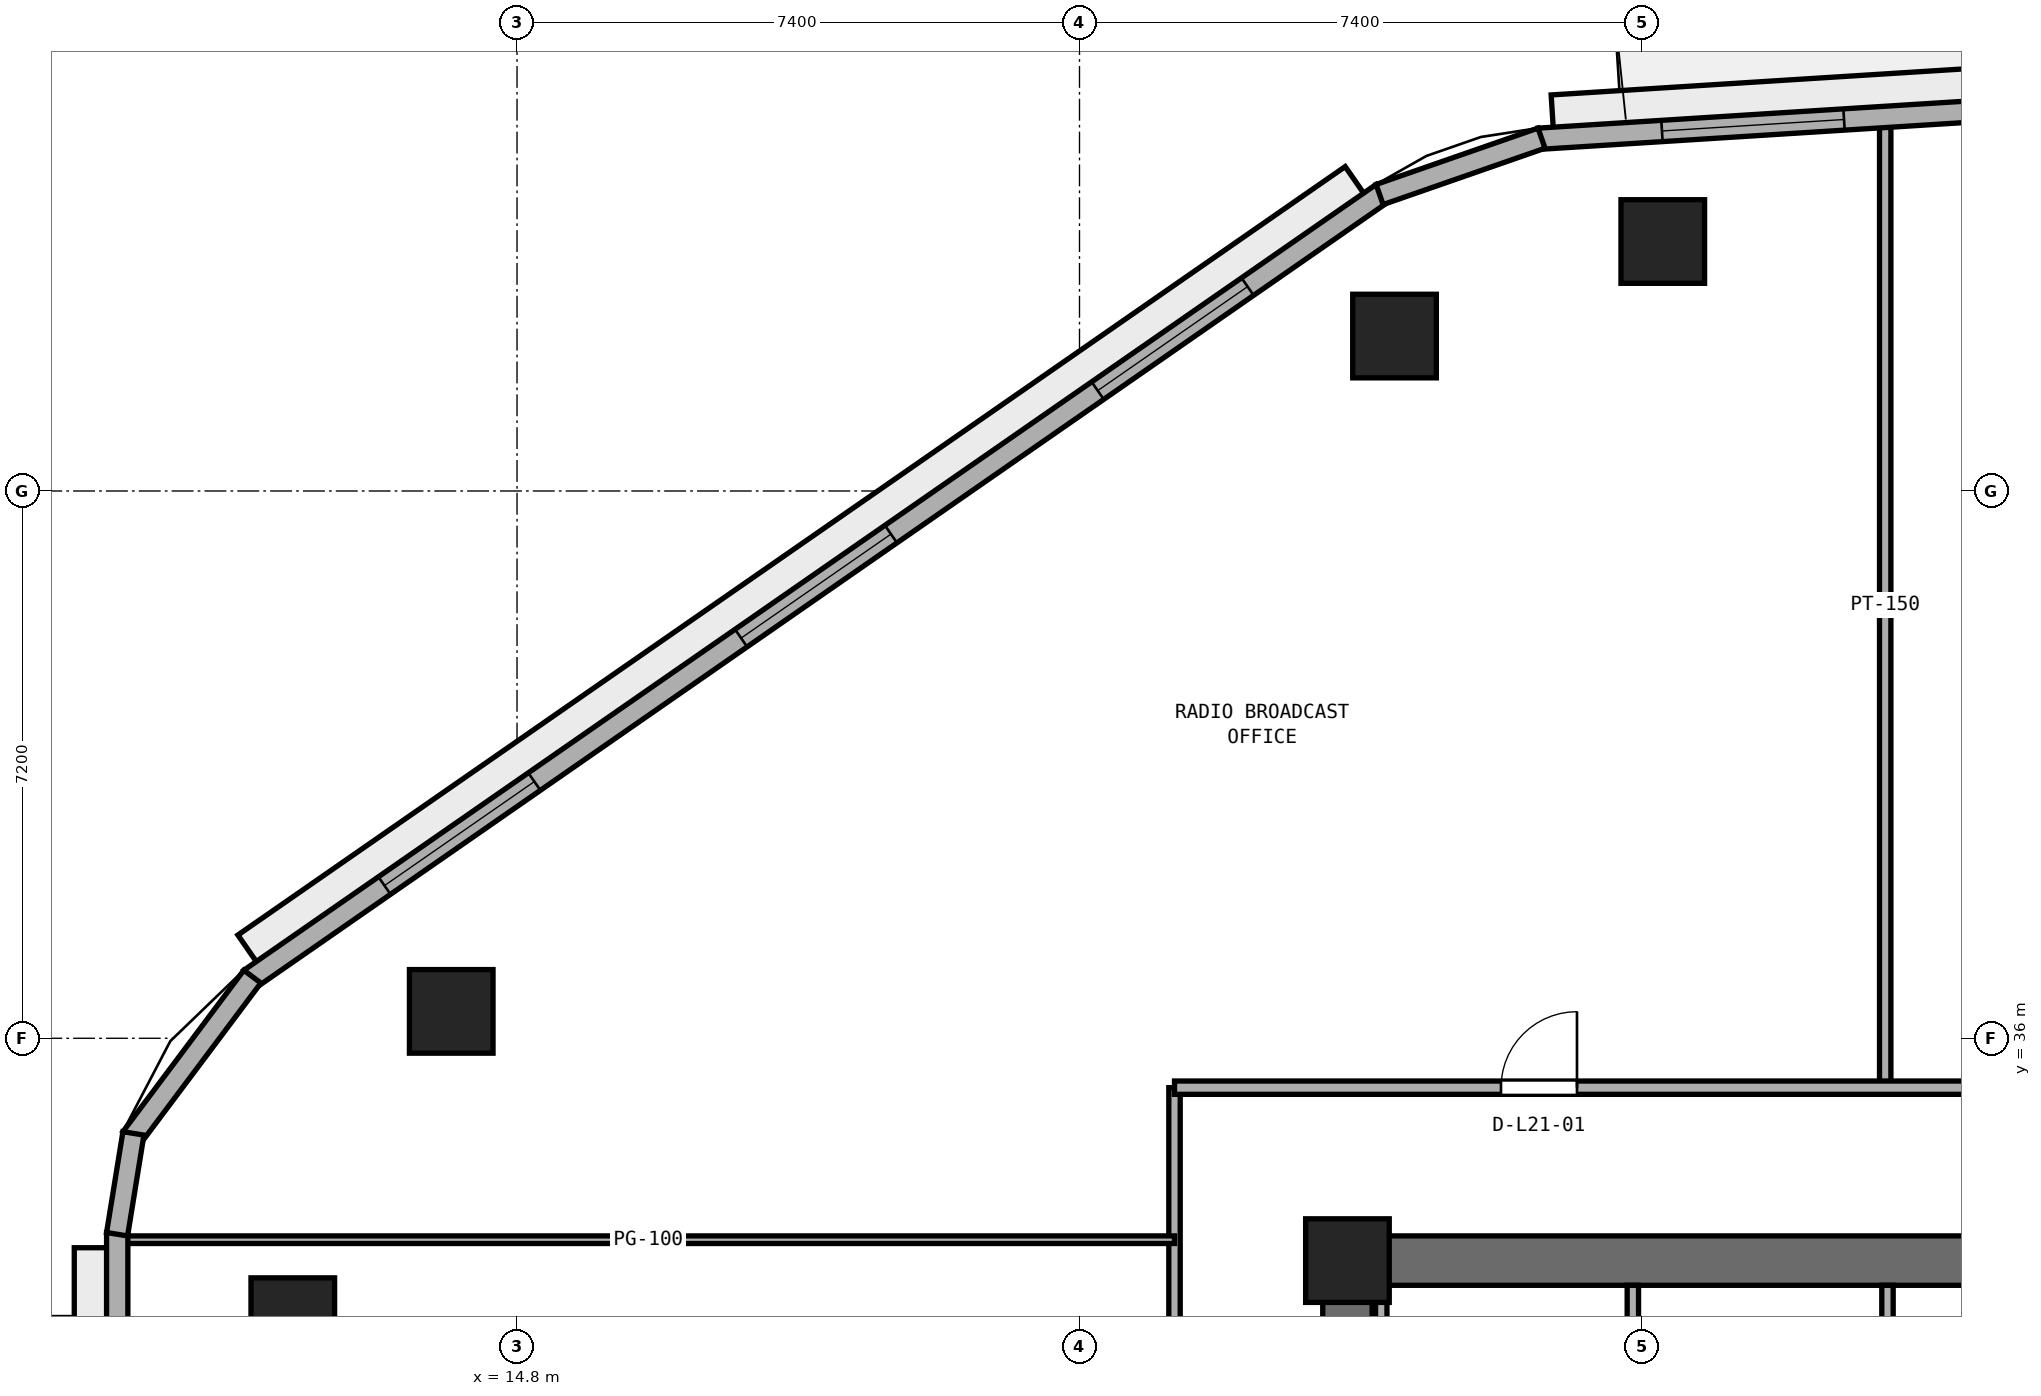
"""IFC4 building model, lengths in metres.
Left out: names, types, materials, properties, quantities, classifications, styles, units other than length and angle.
Written with IfcOpenShell. Run it as: python <this file> out.ifc"""

import sys

from ifc_helpers import new_model, si_unit, direction, frame, frame_2d, origin, origin_2d, place, context, subcontext, project, spatial, rectangle, extrude, element, fill, save


model = new_model("IFC4")
c1 = context("Model", 3, precision=1e-05, world=origin(), true_north=direction((0.0, 1.0)))
c2 = subcontext(c1, "Body", "Model", "MODEL_VIEW")
j1 = project(units=[si_unit("LENGTHUNIT", "METRE"), si_unit("PLANEANGLEUNIT", "RADIAN")], contexts=[c1])
p1 = place(None, origin())
s1 = spatial("IfcSite", under=j1, at=p1, CompositionType="ELEMENT")
p2 = place(p1, origin())
s2 = spatial("IfcBuilding", under=s1, at=p2, CompositionType="ELEMENT")
p3 = place(p2, frame((0.0, 0.0, 85.8)))
s3 = spatial("IfcBuildingStorey", under=s2, at=p3, CompositionType="ELEMENT", Elevation=85.8)
p4 = place(p3, frame((25.4, 33.075, 0.0), z_axis=(0.0, 0.0, 1.0), x_axis=(1.0, 0.0, 0.0)))
e1 = element("IfcWall", 1, at=p4, inside=s3, PredefinedType="SHEAR", context=c2, shape_type="SweptSolid", body=[
    extrude(rectangle(XDim=23.2, YDim=0.65, at=frame_2d((11.6, 0.0))), origin(), (0.0, 0.0, 1.0), 3.525),
])
p5 = place(p3, frame((25.725, 17.65, 0.0), z_axis=(0.0, 0.0, 1.0), x_axis=(0.0, 1.0, 0.0)))
e2 = element("IfcWall", 2, at=p5, inside=s3, PredefinedType="SHEAR", context=c2, shape_type="SweptSolid", body=[
    extrude(rectangle(XDim=15.1, YDim=0.65, at=frame_2d((7.55, 0.0))), origin(), (0.0, 0.0, 1.0), 3.525),
])
p6 = place(p5, frame((6.8, 0.0, 0.0)))
e3 = element("IfcOpeningElement", 3, at=p6, cuts=e2, PredefinedType="OPENING", context=c2, shape_type="SweptSolid", body=[
    extrude(rectangle(XDim=1.5, YDim=2.15, at=frame_2d((0.75, 1.075))), frame((0.0, 0.335, 0.0), z_axis=(0.0, -1.0, 0.0), x_axis=(1.0, 0.0, 0.0)), (0.0, 0.0, 1.0), 0.67),
])
p7 = place(p3, frame((25.725, 33.075, 0.0), z_axis=(0.0, 0.0, 1.0), x_axis=(1.0, 0.0, 0.0)))
e4 = element("IfcColumn", 4, at=p7, inside=s3, PredefinedType="PILASTER", context=c2, shape_type="SweptSolid", body=[
    extrude(rectangle(XDim=1.1, YDim=1.1, at=origin_2d()), origin(), (0.0, 0.0, 1.0), 3.8),
])
for number, where, z_axis, x_axis in (
    (5, (29.874, 46.482, 0.0), (0.0, 0.0, 1.0), (1.0, 0.0, 0.0)),
    (6, (26.344, 45.238, 0.0), (0.0, 0.0, 1.0), (1.0, 0.0, 0.0)),
    (7, (13.934, 36.354, 0.0), (0.0, 0.0, 1.0), (1.0, 0.0, 0.0)),
    (8, (11.85, 32.298, 0.0), (0.0, 0.0, 1.0), (1.0, 0.0, 0.0)),
):
    element("IfcColumn", number, at=place(p3, frame(where, z_axis=z_axis, x_axis=x_axis)), inside=s3, PredefinedType="COLUMN", context=c2, shape_type="SweptSolid", body=[
        extrude(rectangle(XDim=1.1, YDim=1.1, at=origin_2d()), origin(), (0.0, 0.0, 1.0), 3.8),
    ])
for number, where, z_axis, x_axis in (
    (9, (26.17, 30.65, 0.0), (0.0, 0.0, 1.0), (0.0, 1.0, 0.0)),
    (10, (29.48, 30.65, 0.0), (0.0, 0.0, 1.0), (0.0, 1.0, 0.0)),
    (11, (32.83, 30.65, 0.0), (0.0, 0.0, 1.0), (0.0, 1.0, 0.0)),
):
    element("IfcWall", number, at=place(p3, frame(where, z_axis=z_axis, x_axis=x_axis)), inside=s3, PredefinedType="PARTITIONING", context=c2, shape_type="SweptSolid", body=[
        extrude(rectangle(XDim=2.1, YDim=0.15, at=frame_2d((1.05, 0.0))), origin(), (0.0, 0.0, 1.0), 3.525),
    ])
p8 = place(p3, frame((32.8, 35.35, 0.0), z_axis=(0.0, 0.0, 1.0), x_axis=(0.0, 1.0, 0.0)))
e12 = element("IfcWall", 12, at=p8, inside=s3, PredefinedType="PARTITIONING", context=c2, shape_type="SweptSolid", body=[
    extrude(rectangle(XDim=12.707, YDim=0.15, at=frame_2d((6.353, 0.0))), origin(), (0.0, 0.0, 1.0), 3.525),
])
p9 = place(p3, frame((23.45, 15.05, 0.0), z_axis=(0.0, 0.0, 1.0), x_axis=(0.0, 1.0, 0.0)))
e13 = element("IfcWall", 13, at=p9, inside=s3, PredefinedType="PARTITIONING", context=c2, shape_type="SweptSolid", body=[
    extrude(rectangle(XDim=20.3, YDim=0.15, at=frame_2d((10.15, 0.0))), origin(), (0.0, 0.0, 1.0), 3.525),
])
p10 = place(p9, frame((8.025, 0.0, 0.0)))
e14 = element("IfcOpeningElement", 14, at=p10, cuts=e13, PredefinedType="OPENING", context=c2, shape_type="SweptSolid", body=[
    extrude(rectangle(XDim=0.9, YDim=2.1, at=frame_2d((0.45, 1.05))), frame((0.0, 0.085, 0.0), z_axis=(0.0, -1.0, 0.0), x_axis=(1.0, 0.0, 0.0)), (0.0, 0.0, 1.0), 0.17),
])
p11 = place(p9, frame((16.175, 0.0, 0.0)))
e15 = element("IfcOpeningElement", 15, at=p11, cuts=e13, PredefinedType="OPENING", context=c2, shape_type="SweptSolid", body=[
    extrude(rectangle(XDim=0.9, YDim=2.1, at=frame_2d((0.45, 1.05))), frame((0.0, 0.085, 0.0), z_axis=(0.0, -1.0, 0.0), x_axis=(1.0, 0.0, 0.0)), (0.0, 0.0, 1.0), 0.17),
])
p12 = place(p3, frame((9.605, 33.35, 0.0), z_axis=(0.0, 0.0, 1.0), x_axis=(1.0, 0.0, 0.0)))
e16 = element("IfcWall", 16, at=p12, inside=s3, PredefinedType="PARTITIONING", context=c2, shape_type="SweptSolid", body=[
    extrude(rectangle(XDim=13.845, YDim=0.1, at=frame_2d((6.922, 0.0))), origin(), (0.0, 0.0, 1.0), 3.525),
])
p13 = place(p3, frame((23.45, 35.35, 0.0), z_axis=(0.0, 0.0, 1.0), x_axis=(1.0, 0.0, 0.0)))
e17 = element("IfcWall", 17, at=p13, inside=s3, PredefinedType="PARTITIONING", context=c2, shape_type="SweptSolid", body=[
    extrude(rectangle(XDim=27.1, YDim=0.175, at=frame_2d((13.55, 0.0))), origin(), (0.0, 0.0, 1.0), 3.525),
])
p14 = place(p13, frame((4.295, 0.0, 0.0)))
e18 = element("IfcOpeningElement", 18, at=p14, cuts=e17, PredefinedType="OPENING", context=c2, shape_type="SweptSolid", body=[
    extrude(rectangle(XDim=1.0, YDim=2.12, at=frame_2d((0.5, 1.06))), frame((0.0, 0.097, 0.0), z_axis=(0.0, -1.0, 0.0), x_axis=(1.0, 0.0, 0.0)), (0.0, 0.0, 1.0), 0.195),
])
p15 = place(p13, frame((14.6, 0.0, 0.0)))
e19 = element("IfcOpeningElement", 19, at=p15, cuts=e17, PredefinedType="OPENING", context=c2, shape_type="SweptSolid", body=[
    extrude(rectangle(XDim=1.0, YDim=2.12, at=frame_2d((0.5, 1.06))), frame((0.0, 0.097, 0.0), z_axis=(0.0, -1.0, 0.0), x_axis=(1.0, 0.0, 0.0)), (0.0, 0.0, 1.0), 0.195),
])
p16 = place(p13, frame((23.405, 0.0, 0.0)))
e20 = element("IfcOpeningElement", 20, at=p16, cuts=e17, PredefinedType="OPENING", context=c2, shape_type="SweptSolid", body=[
    extrude(rectangle(XDim=0.9, YDim=2.1, at=frame_2d((0.45, 1.05))), frame((0.0, 0.097, 0.0), z_axis=(0.0, -1.0, 0.0), x_axis=(1.0, 0.0, 0.0)), (0.0, 0.0, 1.0), 0.195),
])
p17 = place(p3, frame((47.832, 49.069, 0.0), z_axis=(0.0, 0.0, 1.0), x_axis=(-0.998017725054, -0.062933460723, 0.0)))
e21 = element("IfcWall", 21, at=p17, inside=s3, PredefinedType="STANDARD", context=c2, shape_type="SweptSolid", body=[
    extrude(rectangle(XDim=19.629, YDim=0.28, at=frame_2d((9.815, 0.0))), origin(), (0.0, 0.0, 1.0), 3.525),
])
p18 = place(p17, frame((9.265, 0.0, 0.0)))
e22 = element("IfcOpeningElement", 22, at=p18, cuts=e21, PredefinedType="OPENING", context=c2, shape_type="SweptSolid", body=[
    extrude(rectangle(XDim=1.1, YDim=2.2, at=frame_2d((0.55, 1.1))), frame((0.0, 0.15, 0.0), z_axis=(0.0, -1.0, 0.0), x_axis=(1.0, 0.0, 0.0)), (0.0, 0.0, 1.0), 0.3),
])
p19 = place(p17, frame((15.604, 0.0, 0.9)))
e23 = element("IfcOpeningElement", 23, at=p19, cuts=e21, PredefinedType="OPENING", context=c2, shape_type="SweptSolid", body=[
    extrude(rectangle(XDim=2.4, YDim=1.75, at=frame_2d((1.2, 0.875))), frame((0.0, 0.15, 0.0), z_axis=(0.0, -1.0, 0.0), x_axis=(1.0, 0.0, 0.0)), (0.0, 0.0, 1.0), 0.3),
])
p20 = place(p3, frame((26.182, 47.118, 0.0), z_axis=(0.0, 0.0, 1.0), x_axis=(-0.821547956627, -0.570139417127, 0.0)))
e24 = element("IfcWall", 24, at=p20, inside=s3, PredefinedType="STANDARD", context=c2, shape_type="SweptSolid", body=[
    extrude(rectangle(XDim=18.132, YDim=0.28, at=frame_2d((9.066, 0.0))), origin(), (0.0, 0.0, 1.0), 3.525),
])
p21 = place(p20, frame((2.156, 0.0, 0.9)))
e25 = element("IfcOpeningElement", 25, at=p21, cuts=e24, PredefinedType="OPENING", context=c2, shape_type="SweptSolid", body=[
    extrude(rectangle(XDim=2.4, YDim=1.75, at=frame_2d((1.2, 0.875))), frame((0.0, 0.15, 0.0), z_axis=(0.0, -1.0, 0.0), x_axis=(1.0, 0.0, 0.0)), (0.0, 0.0, 1.0), 0.3),
])
p22 = place(p20, frame((7.866, 0.0, 0.9)))
e26 = element("IfcOpeningElement", 26, at=p22, cuts=e24, PredefinedType="OPENING", context=c2, shape_type="SweptSolid", body=[
    extrude(rectangle(XDim=2.4, YDim=1.75, at=frame_2d((1.2, 0.875))), frame((0.0, 0.15, 0.0), z_axis=(0.0, -1.0, 0.0), x_axis=(1.0, 0.0, 0.0)), (0.0, 0.0, 1.0), 0.3),
])
p23 = place(p20, frame((13.577, 0.0, 0.9)))
e27 = element("IfcOpeningElement", 27, at=p23, cuts=e24, PredefinedType="OPENING", context=c2, shape_type="SweptSolid", body=[
    extrude(rectangle(XDim=2.4, YDim=1.75, at=frame_2d((1.2, 0.875))), frame((0.0, 0.15, 0.0), z_axis=(0.0, -1.0, 0.0), x_axis=(1.0, 0.0, 0.0)), (0.0, 0.0, 1.0), 0.3),
])
p24 = place(p3, frame((9.54, 33.444, 0.0), z_axis=(0.0, 0.0, 1.0), x_axis=(0.0, -1.0, 0.0)))
e28 = element("IfcWall", 28, at=p24, inside=s3, PredefinedType="STANDARD", context=c2, shape_type="SweptSolid", body=[
    extrude(rectangle(XDim=17.301, YDim=0.28, at=frame_2d((8.65, 0.0))), origin(), (0.0, 0.0, 1.0), 3.525),
])
p25 = place(p24, frame((8.1, 0.0, 0.0)))
e29 = element("IfcOpeningElement", 29, at=p25, cuts=e28, PredefinedType="OPENING", context=c2, shape_type="SweptSolid", body=[
    extrude(rectangle(XDim=1.1, YDim=2.2, at=frame_2d((0.55, 1.1))), frame((0.0, 0.15, 0.0), z_axis=(0.0, -1.0, 0.0), x_axis=(1.0, 0.0, 0.0)), (0.0, 0.0, 1.0), 0.3),
])
p26 = place(p24, frame((12.884, 0.0, 0.9)))
e30 = element("IfcOpeningElement", 30, at=p26, cuts=e28, PredefinedType="OPENING", context=c2, shape_type="SweptSolid", body=[
    extrude(rectangle(XDim=2.4, YDim=1.75, at=frame_2d((1.2, 0.875))), frame((0.0, 0.15, 0.0), z_axis=(0.0, -1.0, 0.0), x_axis=(1.0, 0.0, 0.0)), (0.0, 0.0, 1.0), 0.3),
])
p27 = place(p3, frame((28.278, 47.842, 0.0), z_axis=(0.0, 0.0, 1.0), x_axis=(-0.9444559001, -0.328638179106, 0.0)))
e31 = element("IfcWall", 31, at=p27, inside=s3, PredefinedType="STANDARD", context=c2, shape_type="SweptSolid", body=[
    extrude(rectangle(XDim=2.255, YDim=0.28, at=frame_2d((1.128, 0.0))), origin(), (0.0, 0.0, 1.0), 3.525),
])
p28 = place(p3, frame((11.318, 36.811, 0.0), z_axis=(0.0, 0.0, 1.0), x_axis=(-0.599455152629, -0.800408345775, 0.0)))
e32 = element("IfcWall", 32, at=p28, inside=s3, PredefinedType="STANDARD", context=c2, shape_type="SweptSolid", body=[
    extrude(rectangle(XDim=2.653, YDim=0.28, at=frame_2d((1.327, 0.0))), origin(), (0.0, 0.0, 1.0), 3.525),
])
p29 = place(p3, frame((9.753, 34.749, 0.0), z_axis=(0.0, 0.0, 1.0), x_axis=(-0.160037671962, -0.987110907423, 0.0)))
e33 = element("IfcWall", 33, at=p29, inside=s3, PredefinedType="STANDARD", context=c2, shape_type="SweptSolid", body=[
    extrude(rectangle(XDim=1.344, YDim=0.28, at=frame_2d((0.672, 0.0))), origin(), (0.0, 0.0, 1.0), 3.525),
])
p30 = place(p14, origin())
e34 = element("IfcDoor", 34, at=p30, inside=s3, OperationType="SINGLE_SWING_RIGHT", PredefinedType="DOOR", context=c2, shape_type="SweptSolid", body=[
    extrude(rectangle(XDim=1.0, YDim=2.12, at=frame_2d((0.5, 1.06))), frame((0.0, 0.025, 0.0), z_axis=(0.0, -1.0, 0.0), x_axis=(1.0, 0.0, 0.0)), (0.0, 0.0, 1.0), 0.05),
])
fill(e18, e34)
p31 = place(p19, origin())
e35 = element("IfcWindow", 35, at=p31, inside=s3, PartitioningType="SINGLE_PANEL", PredefinedType="WINDOW", context=c2, shape_type="SweptSolid", body=[
    extrude(rectangle(XDim=2.4, YDim=1.75, at=frame_2d((1.2, 0.875))), frame((0.0, 0.03, 0.0), z_axis=(0.0, -1.0, 0.0), x_axis=(1.0, 0.0, 0.0)), (0.0, 0.0, 1.0), 0.06),
])
fill(e23, e35)
p32 = place(p21, origin())
e36 = element("IfcWindow", 36, at=p32, inside=s3, PartitioningType="SINGLE_PANEL", PredefinedType="WINDOW", context=c2, shape_type="SweptSolid", body=[
    extrude(rectangle(XDim=2.4, YDim=1.75, at=frame_2d((1.2, 0.875))), frame((0.0, 0.03, 0.0), z_axis=(0.0, -1.0, 0.0), x_axis=(1.0, 0.0, 0.0)), (0.0, 0.0, 1.0), 0.06),
])
fill(e25, e36)
p33 = place(p22, origin())
e37 = element("IfcWindow", 37, at=p33, inside=s3, PartitioningType="SINGLE_PANEL", PredefinedType="WINDOW", context=c2, shape_type="SweptSolid", body=[
    extrude(rectangle(XDim=2.4, YDim=1.75, at=frame_2d((1.2, 0.875))), frame((0.0, 0.03, 0.0), z_axis=(0.0, -1.0, 0.0), x_axis=(1.0, 0.0, 0.0)), (0.0, 0.0, 1.0), 0.06),
])
fill(e26, e37)
p34 = place(p23, origin())
e38 = element("IfcWindow", 38, at=p34, inside=s3, PartitioningType="SINGLE_PANEL", PredefinedType="WINDOW", context=c2, shape_type="SweptSolid", body=[
    extrude(rectangle(XDim=2.4, YDim=1.75, at=frame_2d((1.2, 0.875))), frame((0.0, 0.03, 0.0), z_axis=(0.0, -1.0, 0.0), x_axis=(1.0, 0.0, 0.0)), (0.0, 0.0, 1.0), 0.06),
])
fill(e27, e38)
save(model, sys.argv[1])
